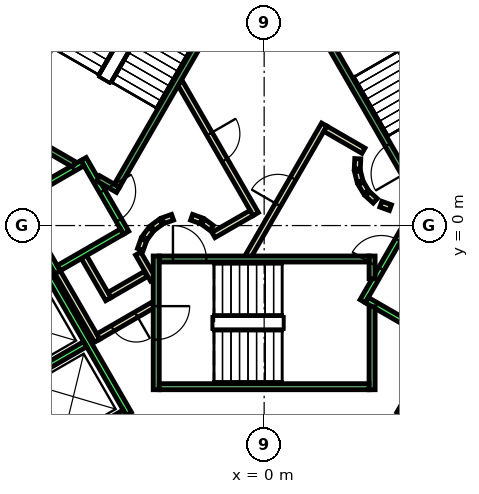
"""IFC4 building model, lengths in metres.
Left out: names, types, materials, properties, quantities, classifications, styles, units other than length and angle.
Written with IfcOpenShell. Run it as: python <this file> out.ifc"""

import sys

from ifc_helpers import new_model, si_unit, direction, frame, frame_2d, origin, place, context, subcontext, project, spatial, polyline, rectangle, outline, extrude, element, fill, save


model = new_model("IFC4")
c1 = context("Model", 3, precision=1e-05, world=origin(), true_north=direction((0.0, 1.0)))
c2 = subcontext(c1, "Body", "Model", "MODEL_VIEW")
j1 = project(units=[si_unit("LENGTHUNIT", "METRE"), si_unit("PLANEANGLEUNIT", "RADIAN")], contexts=[c1])
p1 = place(None, origin())
s1 = spatial("IfcSite", under=j1, at=p1, CompositionType="ELEMENT")
p2 = place(p1, origin())
s2 = spatial("IfcBuilding", under=s1, at=p2, CompositionType="ELEMENT")
p3 = place(p2, origin())
s3 = spatial("IfcBuildingStorey", under=s2, at=p3, CompositionType="ELEMENT", Elevation=0.0)
p4 = place(p3, frame((0.0, 0.0, -0.5)))
e1 = element("IfcWall", 1, at=p4, inside=s3, PredefinedType="SHEAR", context=c2, shape_type="SweptSolid", body=[
    extrude(outline(polyline([(-12.267, 5.252), (-11.402, 4.752), (-6.351, 13.5), (-6.928, 14.5), (-12.267, 5.252)])), origin(), (0.0, 0.0, 1.0), 9.05),
])
p5 = place(p3, frame((-3.9, -1.599, 0.0), z_axis=(0.0, 0.0, 1.0), x_axis=(-0.865969445389, -0.500096910261, 0.0)))
e2 = element("IfcWall", 2, at=p5, inside=s3, PredefinedType="PARTITIONING", context=c2, shape_type="SweptSolid", body=[
    extrude(rectangle(XDim=1.373, YDim=0.2, at=frame_2d((0.687, 0.0))), origin(), (0.0, 0.0, 1.0), 8.55),
])
p6 = place(p3, frame((-5.126, -2.422, 0.0), z_axis=(0.0, 0.0, 1.0), x_axis=(-0.500062241894, 0.865989465428, 0.0)))
e3 = element("IfcWall", 3, at=p6, inside=s3, PredefinedType="PARTITIONING", context=c2, shape_type="SweptSolid", body=[
    extrude(rectangle(XDim=1.7, YDim=0.2, at=frame_2d((0.85, 0.0))), origin(), (0.0, 0.0, 1.0), 8.55),
])
p7 = place(p3, frame((-5.492, -3.788, 0.0), z_axis=(0.0, 0.0, 1.0), x_axis=(-0.500008949224, 0.866020236886, 0.0)))
e4 = element("IfcWall", 4, at=p7, inside=s3, PredefinedType="PARTITIONING", context=c2, shape_type="SweptSolid", body=[
    extrude(rectangle(XDim=2.68, YDim=0.2, at=frame_2d((1.34, 0.0))), origin(), (0.0, 0.0, 1.0), 8.55),
])
p8 = place(p3, frame((-4.145, -0.92, 0.0), z_axis=(0.0, 0.0, 1.0), x_axis=(0.499743786207, -0.866173278362, 0.0)))
e5 = element("IfcWall", 5, at=p8, inside=s3, PredefinedType="PARTITIONING", context=c2, shape_type="SweptSolid", body=[
    extrude(rectangle(XDim=0.991, YDim=0.2, at=frame_2d((0.495, 0.0))), origin(), (0.0, 0.0, 1.0), 8.55),
])
p9 = place(p3, frame((-3.65, -2.61, 0.0), z_axis=(0.0, 0.0, 1.0), x_axis=(-0.866072462134, -0.499918483688, 0.0)))
e6 = element("IfcWall", 6, at=p9, inside=s3, PredefinedType="PARTITIONING", context=c2, shape_type="SweptSolid", body=[
    extrude(rectangle(XDim=2.084, YDim=0.2, at=frame_2d((1.042, 0.0))), origin(), (0.0, 0.0, 1.0), 8.55),
])
p10 = place(p9, frame((0.642, 0.0, 0.0)))
e7 = element("IfcOpeningElement", 7, at=p10, cuts=e6, PredefinedType="OPENING", context=c2, shape_type="SweptSolid", body=[
    extrude(rectangle(XDim=0.9, YDim=2.1, at=frame_2d((0.45, 1.05))), frame((0.0, 0.11, 0.0), z_axis=(0.0, -1.0, 0.0), x_axis=(1.0, 0.0, 0.0)), (0.0, 0.0, 1.0), 0.22),
])
p11 = place(p3, frame((3.079, 2.199, 0.0), z_axis=(0.0, 0.0, 1.0), x_axis=(-0.047771483479, -0.998858290933, 0.0)))
e8 = element("IfcWall", 8, at=p11, inside=s3, PredefinedType="PARTITIONING", context=c2, shape_type="SweptSolid", body=[
    extrude(rectangle(XDim=0.337, YDim=0.2, at=frame_2d((0.169, 0.0))), origin(), (0.0, 0.0, 1.0), 8.55),
])
p12 = place(p3, frame((3.07, 1.786, 0.0), z_axis=(0.0, 0.0, 1.0), x_axis=(0.242705583207, -0.970099994784, 0.0)))
e9 = element("IfcWall", 9, at=p12, inside=s3, PredefinedType="PARTITIONING", context=c2, shape_type="SweptSolid", body=[
    extrude(rectangle(XDim=0.338, YDim=0.2, at=frame_2d((0.169, 0.0))), origin(), (0.0, 0.0, 1.0), 8.55),
])
for number, where, z_axis, x_axis in (
    (10, (3.182, 1.388, 0.0), (0.0, 0.0, 1.0), (0.512, -0.859, 0.0)),
    (11, (3.404, 1.039, 0.0), (0.0, 0.0, 1.0), (0.74, -0.672, 0.0)),
):
    element("IfcWall", number, at=place(p3, frame(where, z_axis=z_axis, x_axis=x_axis)), inside=s3, PredefinedType="PARTITIONING", context=c2, shape_type="SweptSolid", body=[
        extrude(rectangle(XDim=0.338, YDim=0.2, at=frame_2d((0.169, 0.0))), origin(), (0.0, 0.0, 1.0), 8.55),
    ])
p13 = place(p3, frame((3.838, 0.702, 0.0), z_axis=(0.0, 0.0, 1.0), x_axis=(0.941035081519, -0.338308993895, 0.0)))
e12 = element("IfcWall", 12, at=p13, inside=s3, PredefinedType="PARTITIONING", context=c2, shape_type="SweptSolid", body=[
    extrude(rectangle(XDim=0.337, YDim=0.2, at=frame_2d((0.168, 0.0))), origin(), (0.0, 0.0, 1.0), 8.55),
])
p14 = place(p3, frame((-0.52, -1.0, 0.0), z_axis=(0.0, 0.0, 1.0), x_axis=(0.50011622646, 0.865958290007, 0.0)))
e13 = element("IfcWall", 13, at=p14, inside=s3, PredefinedType="PARTITIONING", context=c2, shape_type="SweptSolid", body=[
    extrude(rectangle(XDim=4.991, YDim=0.2, at=frame_2d((2.496, 0.0))), origin(), (0.0, 0.0, 1.0), 8.55),
])
p15 = place(p14, frame((1.945, 0.0, 0.0)))
e14 = element("IfcOpeningElement", 14, at=p15, cuts=e13, PredefinedType="OPENING", context=c2, shape_type="SweptSolid", body=[
    extrude(rectangle(XDim=1.0, YDim=2.1, at=frame_2d((0.5, 1.05))), frame((0.0, 0.11, 0.0), z_axis=(0.0, -1.0, 0.0), x_axis=(1.0, 0.0, 0.0)), (0.0, 0.0, 1.0), 0.22),
])
p16 = place(p3, frame((2.012, 3.186, 0.0), z_axis=(0.0, 0.0, 1.0), x_axis=(0.865891012941, -0.500232699559, 0.0)))
e15 = element("IfcWall", 15, at=p16, inside=s3, PredefinedType="PARTITIONING", context=c2, shape_type="SweptSolid", body=[
    extrude(rectangle(XDim=1.449, YDim=0.2, at=frame_2d((0.725, 0.0))), origin(), (0.0, 0.0, 1.0), 8.55),
])
p17 = place(p3, frame((-0.412, 0.414, 0.0), z_axis=(0.0, 0.0, 1.0), x_axis=(-0.866017369001, -0.500013916395, 0.0)))
e16 = element("IfcWall", 16, at=p17, inside=s3, PredefinedType="PARTITIONING", context=c2, shape_type="SweptSolid", body=[
    extrude(rectangle(XDim=1.45, YDim=0.2, at=frame_2d((0.725, 0.0))), origin(), (0.0, 0.0, 1.0), 8.55),
])
p18 = place(p3, frame((-1.731, -0.077, 0.0), z_axis=(0.0, 0.0, 1.0), x_axis=(-0.804311165252, 0.594208338422, 0.0)))
e17 = element("IfcWall", 17, at=p18, inside=s3, PredefinedType="PARTITIONING", context=c2, shape_type="SweptSolid", body=[
    extrude(rectangle(XDim=0.338, YDim=0.2, at=frame_2d((0.169, 0.0))), origin(), (0.0, 0.0, 1.0), 8.55),
])
p19 = place(p3, frame((-2.07, 0.16, 0.0), z_axis=(0.0, 0.0, 1.0), x_axis=(-0.942199461132, 0.335052496547, 0.0)))
e18 = element("IfcWall", 18, at=p19, inside=s3, PredefinedType="PARTITIONING", context=c2, shape_type="SweptSolid", body=[
    extrude(rectangle(XDim=0.337, YDim=0.2, at=frame_2d((0.169, 0.0))), origin(), (0.0, 0.0, 1.0), 8.55),
])
p20 = place(p3, frame((-3.012, 0.273, 0.0), z_axis=(0.0, 0.0, 1.0), x_axis=(-0.942280615813, -0.334824194261, 0.0)))
e19 = element("IfcWall", 19, at=p20, inside=s3, PredefinedType="PARTITIONING", context=c2, shape_type="SweptSolid", body=[
    extrude(rectangle(XDim=0.338, YDim=0.2, at=frame_2d((0.169, 0.0))), origin(), (0.0, 0.0, 1.0), 8.55),
])
p21 = place(p3, frame((-3.397, 0.124, 0.0), z_axis=(0.0, 0.0, 1.0), x_axis=(-0.804311165252, -0.594208338422, 0.0)))
e20 = element("IfcWall", 20, at=p21, inside=s3, PredefinedType="PARTITIONING", context=c2, shape_type="SweptSolid", body=[
    extrude(rectangle(XDim=0.338, YDim=0.2, at=frame_2d((0.169, 0.0))), origin(), (0.0, 0.0, 1.0), 8.55),
])
p22 = place(p3, frame((-3.723, -0.131, 0.0), z_axis=(0.0, 0.0, 1.0), x_axis=(-0.594675113454, -0.803966112121, 0.0)))
e21 = element("IfcWall", 21, at=p22, inside=s3, PredefinedType="PARTITIONING", context=c2, shape_type="SweptSolid", body=[
    extrude(rectangle(XDim=0.338, YDim=0.2, at=frame_2d((0.169, 0.0))), origin(), (0.0, 0.0, 1.0), 8.55),
])
p23 = place(p3, frame((-3.96, -0.47, 0.0), z_axis=(0.0, 0.0, 1.0), x_axis=(-0.334824194261, -0.942280615813, 0.0)))
e22 = element("IfcWall", 22, at=p23, inside=s3, PredefinedType="PARTITIONING", context=c2, shape_type="SweptSolid", body=[
    extrude(rectangle(XDim=0.338, YDim=0.2, at=frame_2d((0.169, 0.0))), origin(), (0.0, 0.0, 1.0), 8.55),
])
p24 = place(p3, frame((-2.771, 4.7, 0.0), z_axis=(0.0, 0.0, 1.0), x_axis=(0.499969479948, -0.866043023828, 0.0)))
e23 = element("IfcWall", 23, at=p24, inside=s3, PredefinedType="PARTITIONING", context=c2, shape_type="SweptSolid", body=[
    extrude(rectangle(XDim=4.99, YDim=0.2, at=frame_2d((2.495, 0.0))), origin(), (0.0, 0.0, 1.0), 8.55),
])
p25 = place(p24, frame((1.945, 0.0, 0.0)))
e24 = element("IfcOpeningElement", 24, at=p25, cuts=e23, PredefinedType="OPENING", context=c2, shape_type="SweptSolid", body=[
    extrude(rectangle(XDim=1.0, YDim=2.1, at=frame_2d((0.5, 1.05))), frame((0.0, 0.11, 0.0), z_axis=(0.0, -1.0, 0.0), x_axis=(1.0, 0.0, 0.0)), (0.0, 0.0, 1.0), 0.22),
])
p26 = place(p3, frame((-5.94, 2.188, 0.0), z_axis=(0.0, 0.0, 1.0), x_axis=(0.49994636267, -0.866056369097, 0.0)))
e25 = element("IfcWall", 25, at=p26, inside=s3, PredefinedType="STANDARD", context=c2, shape_type="SweptSolid", body=[
    extrude(rectangle(XDim=2.8, YDim=0.2, at=frame_2d((1.4, 0.0))), origin(), (0.0, 0.0, 1.0), 8.55),
])
p27 = place(p26, frame((1.225, 0.0, 0.0)))
e26 = element("IfcOpeningElement", 26, at=p27, cuts=e25, PredefinedType="OPENING", context=c2, shape_type="SweptSolid", body=[
    extrude(rectangle(XDim=1.1, YDim=2.1, at=frame_2d((0.55, 1.05))), frame((0.0, 0.11, 0.0), z_axis=(0.0, -1.0, 0.0), x_axis=(1.0, 0.0, 0.0)), (0.0, 0.0, 1.0), 0.22),
])
p28 = place(p3, frame((-8.192, 0.888, 0.0), z_axis=(0.0, 0.0, 1.0), x_axis=(0.49994636267, -0.866056369097, 0.0)))
e27 = element("IfcWall", 27, at=p28, inside=s3, PredefinedType="STANDARD", context=c2, shape_type="SweptSolid", body=[
    extrude(rectangle(XDim=2.8, YDim=0.2, at=frame_2d((1.4, 0.0))), origin(), (0.0, 0.0, 1.0), 8.55),
])
for number, where, z_axis, x_axis in (
    (28, (-5.977, 2.052, 0.0), (0.0, 0.0, 1.0), (-0.866, -0.5, 0.0)),
    (29, (-4.677, -0.2, 0.0), (0.0, 0.0, 1.0), (-0.866, -0.5, 0.0)),
):
    element("IfcWall", number, at=place(p3, frame(where, z_axis=z_axis, x_axis=x_axis)), inside=s3, PredefinedType="STANDARD", context=c2, shape_type="SweptSolid", body=[
        extrude(rectangle(XDim=2.399, YDim=0.2, at=frame_2d((1.2, 0.0))), origin(), (0.0, 0.0, 1.0), 8.55),
    ])
p29 = place(p3, frame((-9.751, 2.99, 0.0), z_axis=(0.0, 0.0, 1.0), x_axis=(0.50000090737, -0.866024879913, 0.0)))
e30 = element("IfcWall", 30, at=p29, inside=s3, PredefinedType="STANDARD", context=c2, shape_type="SweptSolid", body=[
    extrude(rectangle(XDim=10.6, YDim=0.2, at=frame_2d((5.3, 0.0))), origin(), (0.0, 0.0, 1.0), 8.55),
])
for number, where, z_axis, x_axis in (
    (31, (-5.888, -3.902, 0.0), (0.0, 0.0, 1.0), (-0.866, -0.5, 0.0)),
    (32, (-4.588, -6.153, 0.0), (0.0, 0.0, 1.0), (-0.866, -0.5, 0.0)),
):
    element("IfcWall", number, at=place(p3, frame(where, z_axis=z_axis, x_axis=x_axis)), inside=s3, PredefinedType="STANDARD", context=c2, shape_type="SweptSolid", body=[
        extrude(rectangle(XDim=2.5, YDim=0.2, at=frame_2d((1.25, 0.0))), origin(), (0.0, 0.0, 1.0), 8.55),
    ])
p30 = place(p3, frame((3.24, -2.488, 0.0), z_axis=(0.0, 0.0, 1.0), x_axis=(0.49994636267, 0.866056369097, 0.0)))
e33 = element("IfcWall", 33, at=p30, inside=s3, PredefinedType="STANDARD", context=c2, shape_type="SweptSolid", body=[
    extrude(rectangle(XDim=2.8, YDim=0.2, at=frame_2d((1.4, 0.0))), origin(), (0.0, 0.0, 1.0), 8.55),
])
p31 = place(p30, frame((1.225, 0.0, 0.0)))
e34 = element("IfcOpeningElement", 34, at=p31, cuts=e33, PredefinedType="OPENING", context=c2, shape_type="SweptSolid", body=[
    extrude(rectangle(XDim=1.1, YDim=2.1, at=frame_2d((0.55, 1.05))), frame((0.0, 0.11, 0.0), z_axis=(0.0, -1.0, 0.0), x_axis=(1.0, 0.0, 0.0)), (0.0, 0.0, 1.0), 0.22),
])
p32 = place(p3, frame((3.377, -2.452, 0.0), z_axis=(0.0, 0.0, 1.0), x_axis=(0.865955154139, -0.50012165622, 0.0)))
e35 = element("IfcWall", 35, at=p32, inside=s3, PredefinedType="STANDARD", context=c2, shape_type="SweptSolid", body=[
    extrude(rectangle(XDim=2.4, YDim=0.2, at=frame_2d((1.2, 0.0))), origin(), (0.0, 0.0, 1.0), 8.55),
])
p33 = place(p3, frame((4.451, -6.19, 0.0), z_axis=(0.0, 0.0, 1.0), x_axis=(0.50000090737, 0.866024879913, 0.0)))
e36 = element("IfcWall", 36, at=p33, inside=s3, PredefinedType="STANDARD", context=c2, shape_type="SweptSolid", body=[
    extrude(rectangle(XDim=10.6, YDim=0.2, at=frame_2d((5.3, 0.0))), origin(), (0.0, 0.0, 1.0), 8.55),
])
p34 = place(p3, frame((-3.55, -1.0, 0.0), z_axis=(0.0, 0.0, 1.0), x_axis=(0.0, -1.0, 0.0)))
e37 = element("IfcWall", 37, at=p34, inside=s3, PredefinedType="STANDARD", context=c2, shape_type="SweptSolid", body=[
    extrude(rectangle(XDim=4.4, YDim=0.2, at=frame_2d((2.2, 0.0))), origin(), (0.0, 0.0, 1.0), 8.55),
])
p35 = place(p34, frame((1.65, 0.0, 0.0)))
e38 = element("IfcOpeningElement", 38, at=p35, cuts=e37, PredefinedType="OPENING", context=c2, shape_type="SweptSolid", body=[
    extrude(rectangle(XDim=1.1, YDim=2.2, at=frame_2d((0.55, 1.1))), frame((0.0, 0.11, 0.0), z_axis=(0.0, -1.0, 0.0), x_axis=(1.0, 0.0, 0.0)), (0.0, 0.0, 1.0), 0.22),
])
p36 = place(p3, frame((3.55, -2.667, 0.0), z_axis=(0.0, 0.0, 1.0), x_axis=(0.0, -1.0, 0.0)))
e39 = element("IfcWall", 39, at=p36, inside=s3, PredefinedType="STANDARD", context=c2, shape_type="SweptSolid", body=[
    extrude(rectangle(XDim=2.733, YDim=0.2, at=frame_2d((1.366, 0.0))), origin(), (0.0, 0.0, 1.0), 8.55),
])
p37 = place(p3, frame((3.55, -1.0, 0.0), z_axis=(0.0, 0.0, 1.0), x_axis=(0.0, -1.0, 0.0)))
e40 = element("IfcWall", 40, at=p37, inside=s3, PredefinedType="STANDARD", context=c2, shape_type="SweptSolid", body=[
    extrude(rectangle(XDim=0.751, YDim=0.2, at=frame_2d((0.375, 0.0))), origin(), (0.0, 0.0, 1.0), 8.55),
])
p38 = place(p3, frame((-3.45, -1.1, 0.0), z_axis=(0.0, 0.0, 1.0), x_axis=(1.0, 0.0, 0.0)))
e41 = element("IfcWall", 41, at=p38, inside=s3, PredefinedType="STANDARD", context=c2, shape_type="SweptSolid", body=[
    extrude(rectangle(XDim=6.9, YDim=0.2, at=frame_2d((3.45, 0.0))), origin(), (0.0, 0.0, 1.0), 8.55),
])
p39 = place(p38, frame((0.45, 0.0, 0.0)))
e42 = element("IfcOpeningElement", 42, at=p39, cuts=e41, PredefinedType="OPENING", context=c2, shape_type="SweptSolid", body=[
    extrude(rectangle(XDim=1.1, YDim=2.2, at=frame_2d((0.55, 1.1))), frame((0.0, 0.11, 0.0), z_axis=(0.0, -1.0, 0.0), x_axis=(1.0, 0.0, 0.0)), (0.0, 0.0, 1.0), 0.22),
])
p40 = place(p3, frame((-3.45, -5.3, 0.0), z_axis=(0.0, 0.0, 1.0), x_axis=(1.0, 0.0, 0.0)))
e43 = element("IfcWall", 43, at=p40, inside=s3, PredefinedType="STANDARD", context=c2, shape_type="SweptSolid", body=[
    extrude(rectangle(XDim=6.9, YDim=0.2, at=frame_2d((3.45, 0.0))), origin(), (0.0, 0.0, 1.0), 8.55),
])
p41 = place(p3, frame((4.843, 1.312, 0.0), z_axis=(0.0, 0.0, 1.0), x_axis=(-0.499963383562, 0.866046543262, 0.0)))
e44 = element("IfcWall", 44, at=p41, inside=s3, PredefinedType="STANDARD", context=c2, shape_type="SweptSolid", body=[
    extrude(rectangle(XDim=6.9, YDim=0.2, at=frame_2d((3.45, 0.0))), origin(), (0.0, 0.0, 1.0), 8.55),
])
p42 = place(p41, frame((0.45, 0.0, 0.0)))
e45 = element("IfcOpeningElement", 45, at=p42, cuts=e44, PredefinedType="OPENING", context=c2, shape_type="SweptSolid", body=[
    extrude(rectangle(XDim=1.1, YDim=2.2, at=frame_2d((0.55, 1.1))), frame((0.0, 0.11, 0.0), z_axis=(0.0, -1.0, 0.0), x_axis=(1.0, 0.0, 0.0)), (0.0, 0.0, 1.0), 0.22),
])
p43 = place(p3, frame((-6.25, 2.01, 0.0), z_axis=(0.0, 0.0, 1.0), x_axis=(-0.86611865017, 0.499838457731, 0.0)))
e46 = element("IfcWall", 46, at=p43, inside=s3, PredefinedType="STANDARD", context=c2, shape_type="SweptSolid", body=[
    extrude(rectangle(XDim=2.733, YDim=0.2, at=frame_2d((1.366, 0.0))), origin(), (0.0, 0.0, 1.0), 8.55),
])
p44 = place(p3, frame((-4.806, 1.176, 0.0), z_axis=(0.0, 0.0, 1.0), x_axis=(-0.866558586415, 0.499075361355, 0.0)))
e47 = element("IfcWall", 47, at=p44, inside=s3, PredefinedType="STANDARD", context=c2, shape_type="SweptSolid", body=[
    extrude(rectangle(XDim=0.751, YDim=0.2, at=frame_2d((0.376, 0.0))), origin(), (0.0, 0.0, 1.0), 8.55),
])
p45 = place(p3, frame((-1.393, 7.288, 0.0), z_axis=(0.0, 0.0, 1.0), x_axis=(-0.499963383562, -0.866046543262, 0.0)))
e48 = element("IfcWall", 48, at=p45, inside=s3, PredefinedType="STANDARD", context=c2, shape_type="SweptSolid", body=[
    extrude(rectangle(XDim=6.9, YDim=0.2, at=frame_2d((3.45, 0.0))), origin(), (0.0, 0.0, 1.0), 8.55),
])
p46 = place(p45, frame((0.45, 0.0, 0.0)))
e49 = element("IfcOpeningElement", 49, at=p46, cuts=e48, PredefinedType="OPENING", context=c2, shape_type="SweptSolid", body=[
    extrude(rectangle(XDim=1.1, YDim=2.2, at=frame_2d((0.55, 1.1))), frame((0.0, 0.11, 0.0), z_axis=(0.0, -1.0, 0.0), x_axis=(1.0, 0.0, 0.0)), (0.0, 0.0, 1.0), 0.22),
])
p47 = place(p3, frame((-5.03, 9.388, 0.0), z_axis=(0.0, 0.0, 1.0), x_axis=(-0.499978703459, -0.866037698999, 0.0)))
e50 = element("IfcWall", 50, at=p47, inside=s3, PredefinedType="STANDARD", context=c2, shape_type="SweptSolid", body=[
    extrude(rectangle(XDim=6.9, YDim=0.2, at=frame_2d((3.45, 0.0))), origin(), (0.0, 0.0, 1.0), 8.55),
])
p48 = place(p15, origin())
e51 = element("IfcDoor", 51, at=p48, inside=s3, OperationType="SINGLE_SWING_LEFT", PredefinedType="DOOR", context=c2, shape_type="SweptSolid", body=[
    extrude(rectangle(XDim=1.0, YDim=2.1, at=frame_2d((0.5, 1.05))), frame((0.0, 0.025, 0.0), z_axis=(0.0, -1.0, 0.0), x_axis=(1.0, 0.0, 0.0)), (0.0, 0.0, 1.0), 0.05),
])
fill(e14, e51)
p49 = place(p25, origin())
e52 = element("IfcDoor", 52, at=p49, inside=s3, OperationType="SINGLE_SWING_RIGHT", PredefinedType="DOOR", context=c2, shape_type="SweptSolid", body=[
    extrude(rectangle(XDim=1.0, YDim=2.1, at=frame_2d((0.5, 1.05))), frame((0.0, 0.025, 0.0), z_axis=(0.0, -1.0, 0.0), x_axis=(1.0, 0.0, 0.0)), (0.0, 0.0, 1.0), 0.05),
])
fill(e24, e52)
p50 = place(p10, origin())
e53 = element("IfcDoor", 53, at=p50, inside=s3, OperationType="SINGLE_SWING_LEFT", PredefinedType="DOOR", context=c2, shape_type="SweptSolid", body=[
    extrude(rectangle(XDim=0.9, YDim=2.1, at=frame_2d((0.45, 1.05))), frame((0.0, 0.025, 0.0), z_axis=(0.0, -1.0, 0.0), x_axis=(1.0, 0.0, 0.0)), (0.0, 0.0, 1.0), 0.05),
])
fill(e7, e53)
p51 = place(p31, origin())
e54 = element("IfcDoor", 54, at=p51, inside=s3, OperationType="SLIDING_TO_LEFT", PredefinedType="DOOR", context=c2, shape_type="SweptSolid", body=[
    extrude(rectangle(XDim=1.1, YDim=2.1, at=frame_2d((0.55, 1.05))), frame((0.0, 0.025, 0.0), z_axis=(0.0, -1.0, 0.0), x_axis=(1.0, 0.0, 0.0)), (0.0, 0.0, 1.0), 0.05),
])
fill(e34, e54)
p52 = place(p27, origin())
e55 = element("IfcDoor", 55, at=p52, inside=s3, OperationType="SLIDING_TO_LEFT", PredefinedType="DOOR", context=c2, shape_type="SweptSolid", body=[
    extrude(rectangle(XDim=1.1, YDim=2.1, at=frame_2d((0.55, 1.05))), frame((0.0, 0.025, 0.0), z_axis=(0.0, -1.0, 0.0), x_axis=(1.0, 0.0, 0.0)), (0.0, 0.0, 1.0), 0.05),
])
fill(e26, e55)
p53 = place(p39, origin())
e56 = element("IfcDoor", 56, at=p53, inside=s3, OperationType="SINGLE_SWING_LEFT", PredefinedType="DOOR", context=c2, shape_type="SweptSolid", body=[
    extrude(rectangle(XDim=1.1, YDim=2.2, at=frame_2d((0.55, 1.1))), frame((0.0, 0.025, 0.0), z_axis=(0.0, -1.0, 0.0), x_axis=(1.0, 0.0, 0.0)), (0.0, 0.0, 1.0), 0.05),
])
fill(e42, e56)
p54 = place(p35, origin())
e57 = element("IfcDoor", 57, at=p54, inside=s3, OperationType="SINGLE_SWING_LEFT", PredefinedType="DOOR", context=c2, shape_type="SweptSolid", body=[
    extrude(rectangle(XDim=1.1, YDim=2.2, at=frame_2d((0.55, 1.1))), frame((0.0, 0.025, 0.0), z_axis=(0.0, -1.0, 0.0), x_axis=(1.0, 0.0, 0.0)), (0.0, 0.0, 1.0), 0.05),
])
fill(e38, e57)
p55 = place(p42, origin())
e58 = element("IfcDoor", 58, at=p55, inside=s3, OperationType="SINGLE_SWING_LEFT", PredefinedType="DOOR", context=c2, shape_type="SweptSolid", body=[
    extrude(rectangle(XDim=1.1, YDim=2.2, at=frame_2d((0.55, 1.1))), frame((0.0, 0.025, 0.0), z_axis=(0.0, -1.0, 0.0), x_axis=(1.0, 0.0, 0.0)), (0.0, 0.0, 1.0), 0.05),
])
fill(e45, e58)
save(model, sys.argv[1])
